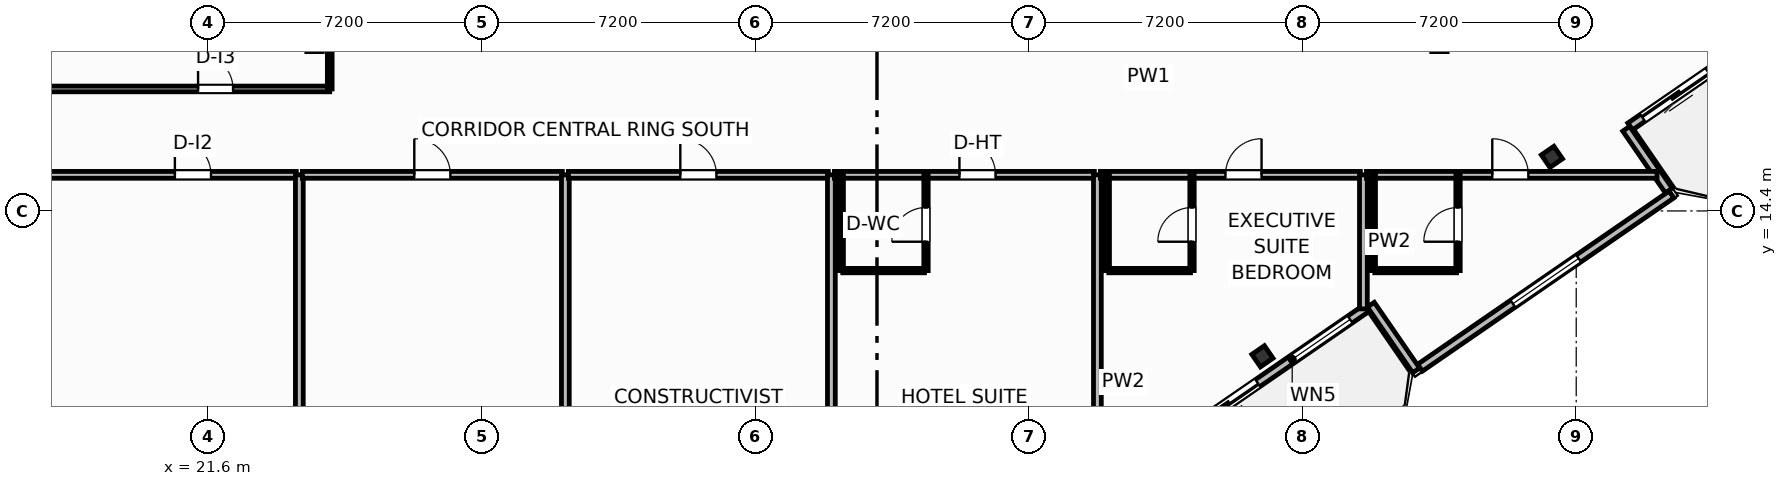
"""IFC4 building model, lengths in metres.
Left out: names, types, materials, properties, quantities, classifications, styles, units other than length and angle.
Written with IfcOpenShell. Run it as: python <this file> out.ifc"""

import sys

from ifc_helpers import new_model, si_unit, direction, frame, frame_2d, origin, origin_2d, place, context, subcontext, project, spatial, rectangle, i_section, extrude, element, fill, save


model = new_model("IFC4")
c1 = context("Model", 3, precision=1e-05, world=origin(), true_north=direction((0.0, 1.0)))
c2 = subcontext(c1, "Body", "Model", "MODEL_VIEW")
j1 = project(units=[si_unit("LENGTHUNIT", "METRE"), si_unit("PLANEANGLEUNIT", "RADIAN")], contexts=[c1])
p1 = place(None, origin())
s1 = spatial("IfcSite", under=j1, at=p1, CompositionType="ELEMENT")
p2 = place(p1, origin())
s2 = spatial("IfcBuilding", under=s1, at=p2, CompositionType="ELEMENT")
p3 = place(p2, frame((0.0, 0.0, 261.9)))
s3 = spatial("IfcBuildingStorey", under=s2, at=p3, CompositionType="ELEMENT", Elevation=261.9)
for number, where, z_axis, x_axis in (
    (1, (49.343, 10.575, 0.0), (0.0, 0.0, 1.0), (0.824, 0.567, 0.0)),
    (2, (56.96, 15.823, 0.0), (0.0, 0.0, 1.0), (0.824, 0.567, 0.0)),
):
    element("IfcColumn", number, at=place(p3, frame(where, z_axis=z_axis, x_axis=x_axis)), inside=s3, PredefinedType="COLUMN", context=c2, shape_type="SweptSolid", body=[
        extrude(i_section(OverallWidth=0.401, OverallDepth=0.399, WebThickness=0.025, FlangeThickness=0.04, FilletRadius=0.022, at=origin_2d()), origin(), (0.0, 0.0, 1.0), 3.7),
    ])
p4 = place(p3, frame((52.103, 11.857, 0.0), z_axis=(0.0, 0.0, 1.0), x_axis=(-0.823534636215, -0.567265989598, 0.0)))
e3 = element("IfcWall", 3, at=p4, inside=s3, PredefinedType="SOLIDWALL", context=c2, shape_type="SweptSolid", body=[
    extrude(rectangle(XDim=6.0, YDim=0.22, at=frame_2d((3.0, 0.0))), origin(), (0.0, 0.0, 1.0), 2.73),
])
p5 = place(p4, frame((3.5, 0.0, 0.0)))
e4 = element("IfcOpeningElement", 4, at=p5, cuts=e3, PredefinedType="OPENING", context=c2, shape_type="SweptSolid", body=[
    extrude(rectangle(XDim=2.1, YDim=2.3, at=frame_2d((1.05, 1.15))), frame((0.0, 0.12, 0.0), z_axis=(0.0, -1.0, 0.0), x_axis=(1.0, 0.0, 0.0)), (0.0, 0.0, 1.0), 0.24),
])
p6 = place(p4, frame((0.55, 0.0, 0.75)))
e5 = element("IfcOpeningElement", 5, at=p6, cuts=e3, PredefinedType="OPENING", context=c2, shape_type="SweptSolid", body=[
    extrude(rectangle(XDim=1.85, YDim=1.75, at=frame_2d((0.925, 0.875))), frame((0.0, 0.12, 0.0), z_axis=(0.0, -1.0, 0.0), x_axis=(1.0, 0.0, 0.0)), (0.0, 0.0, 1.0), 0.24),
])
p7 = place(p3, frame((63.605, 19.78, 0.0), z_axis=(0.0, 0.0, 1.0), x_axis=(-0.823541290762, -0.567256328665, 0.0)))
e6 = element("IfcWall", 6, at=p7, inside=s3, PredefinedType="SOLIDWALL", context=c2, shape_type="SweptSolid", body=[
    extrude(rectangle(XDim=5.567, YDim=0.22, at=frame_2d((2.784, 0.0))), origin(), (0.0, 0.0, 1.0), 2.73),
])
p8 = place(p7, frame((3.067, 0.0, 0.0)))
e7 = element("IfcOpeningElement", 7, at=p8, cuts=e6, PredefinedType="OPENING", context=c2, shape_type="SweptSolid", body=[
    extrude(rectangle(XDim=2.1, YDim=2.3, at=frame_2d((1.05, 1.15))), frame((0.0, 0.12, 0.0), z_axis=(0.0, -1.0, 0.0), x_axis=(1.0, 0.0, 0.0)), (0.0, 0.0, 1.0), 0.24),
])
p9 = place(p3, frame((52.196, 11.933, 0.0), z_axis=(0.0, 0.0, 1.0), x_axis=(0.56729822855, -0.823512428494, 0.0)))
e8 = element("IfcWall", 8, at=p9, inside=s3, PredefinedType="SOLIDWALL", context=c2, shape_type="SweptSolid", body=[
    extrude(rectangle(XDim=2.1, YDim=0.22, at=frame_2d((1.05, 0.0))), origin(), (0.0, 0.0, 1.0), 2.73),
])
p10 = place(p3, frame((53.49, 10.275, 0.0), z_axis=(0.0, 0.0, 1.0), x_axis=(0.823530942962, 0.56727135128, 0.0)))
e9 = element("IfcWall", 9, at=p10, inside=s3, PredefinedType="SOLIDWALL", context=c2, shape_type="SweptSolid", body=[
    extrude(rectangle(XDim=8.035, YDim=0.22, at=frame_2d((4.018, 0.0))), origin(), (0.0, 0.0, 1.0), 2.73),
])
p11 = place(p10, frame((2.968, 0.0, 0.8)))
e10 = element("IfcOpeningElement", 10, at=p11, cuts=e9, PredefinedType="OPENING", context=c2, shape_type="SweptSolid", body=[
    extrude(rectangle(XDim=2.1, YDim=1.75, at=frame_2d((1.05, 0.875))), frame((0.0, 0.12, 0.0), z_axis=(0.0, -1.0, 0.0), x_axis=(1.0, 0.0, 0.0)), (0.0, 0.0, 1.0), 0.24),
])
p12 = place(p3, frame((60.036, 14.936, 0.0), z_axis=(0.0, 0.0, 1.0), x_axis=(-0.567273565974, 0.823529417415, 0.0)))
e11 = element("IfcWall", 11, at=p12, inside=s3, PredefinedType="SOLIDWALL", context=c2, shape_type="SweptSolid", body=[
    extrude(rectangle(XDim=1.975, YDim=0.22, at=frame_2d((0.988, 0.0))), origin(), (0.0, 0.0, 1.0), 2.73),
])
p13 = place(p3, frame((5.0, 17.61, 0.0), z_axis=(0.0, 0.0, 1.0), x_axis=(1.0, 0.0, 0.0)))
e12 = element("IfcWall", 12, at=p13, inside=s3, PredefinedType="PARTITIONING", context=c2, shape_type="SweptSolid", body=[
    extrude(rectangle(XDim=19.8, YDim=0.15, at=frame_2d((9.9, 0.0))), origin(), (0.0, 0.0, 1.0), 2.739),
])
p14 = place(p13, frame((16.335, 0.0, 0.0)))
e13 = element("IfcOpeningElement", 13, at=p14, cuts=e12, PredefinedType="OPENING", context=c2, shape_type="SweptSolid", body=[
    extrude(rectangle(XDim=0.92, YDim=2.05, at=frame_2d((0.46, 1.025))), frame((0.0, 0.085, 0.0), z_axis=(0.0, -1.0, 0.0), x_axis=(1.0, 0.0, 0.0)), (0.0, 0.0, 1.0), 0.17),
])
p15 = place(p3, frame((24.8, 17.61, 0.0), z_axis=(0.0, 0.0, 1.0), x_axis=(0.0, 1.0, 0.0)))
e14 = element("IfcWall", 14, at=p15, inside=s3, PredefinedType="PARTITIONING", context=c2, shape_type="SweptSolid", body=[
    extrude(rectangle(XDim=1.63, YDim=0.125, at=frame_2d((0.815, 0.0))), origin(), (0.0, 0.0, 1.0), 3.45),
])
p16 = place(p3, frame((6.071, 15.35, 0.0), z_axis=(0.0, 0.0, 1.0), x_axis=(1.0, 0.0, 0.0)))
e15 = element("IfcWall", 15, at=p16, inside=s3, PredefinedType="PARTITIONING", context=c2, shape_type="SweptSolid", body=[
    extrude(rectangle(XDim=17.849, YDim=0.18, at=frame_2d((8.924, 0.0))), origin(), (0.0, 0.0, 1.0), 3.45),
])
p17 = place(p16, frame((14.654, 0.0, 0.0)))
e16 = element("IfcOpeningElement", 16, at=p17, cuts=e15, PredefinedType="OPENING", context=c2, shape_type="SweptSolid", body=[
    extrude(rectangle(XDim=0.95, YDim=2.05, at=frame_2d((0.475, 1.025))), frame((0.0, 0.1, 0.0), z_axis=(0.0, -1.0, 0.0), x_axis=(1.0, 0.0, 0.0)), (0.0, 0.0, 1.0), 0.2),
])
p18 = place(p3, frame((24.0, -4.0, 0.0), z_axis=(0.0, 0.0, 1.0), x_axis=(0.0, 1.0, 0.0)))
e17 = element("IfcWall", 17, at=p18, inside=s3, PredefinedType="PARTITIONING", context=c2, shape_type="SweptSolid", body=[
    extrude(rectangle(XDim=19.35, YDim=0.205, at=frame_2d((9.675, 0.0))), origin(), (0.0, 0.0, 1.0), 3.45),
])
p19 = place(p3, frame((24.08, 15.35, 0.0), z_axis=(0.0, 0.0, 1.0), x_axis=(1.0, 0.0, 0.0)))
e18 = element("IfcWall", 18, at=p19, inside=s3, PredefinedType="PARTITIONING", context=c2, shape_type="SweptSolid", body=[
    extrude(rectangle(XDim=6.84, YDim=0.18, at=frame_2d((3.42, 0.0))), origin(), (0.0, 0.0, 1.0), 3.45),
])
p20 = place(p19, frame((2.945, 0.0, 0.0)))
e19 = element("IfcOpeningElement", 19, at=p20, cuts=e18, PredefinedType="OPENING", context=c2, shape_type="SweptSolid", body=[
    extrude(rectangle(XDim=0.95, YDim=2.05, at=frame_2d((0.475, 1.025))), frame((0.0, 0.1, 0.0), z_axis=(0.0, -1.0, 0.0), x_axis=(1.0, 0.0, 0.0)), (0.0, 0.0, 1.0), 0.2),
])
p21 = place(p3, frame((31.0, -5.112, 0.0), z_axis=(0.0, 0.0, 1.0), x_axis=(0.0, 1.0, 0.0)))
e20 = element("IfcWall", 20, at=p21, inside=s3, PredefinedType="PARTITIONING", context=c2, shape_type="SweptSolid", body=[
    extrude(rectangle(XDim=20.462, YDim=0.205, at=frame_2d((10.231, 0.0))), origin(), (0.0, 0.0, 1.0), 3.45),
])
p22 = place(p3, frame((31.08, 15.35, 0.0), z_axis=(0.0, 0.0, 1.0), x_axis=(1.0, 0.0, 0.0)))
e21 = element("IfcWall", 21, at=p22, inside=s3, PredefinedType="PARTITIONING", context=c2, shape_type="SweptSolid", body=[
    extrude(rectangle(XDim=6.84, YDim=0.18, at=frame_2d((3.42, 0.0))), origin(), (0.0, 0.0, 1.0), 3.45),
])
p23 = place(p22, frame((2.945, 0.0, 0.0)))
e22 = element("IfcOpeningElement", 22, at=p23, cuts=e21, PredefinedType="OPENING", context=c2, shape_type="SweptSolid", body=[
    extrude(rectangle(XDim=0.95, YDim=2.05, at=frame_2d((0.475, 1.025))), frame((0.0, 0.1, 0.0), z_axis=(0.0, -1.0, 0.0), x_axis=(1.0, 0.0, 0.0)), (0.0, 0.0, 1.0), 0.2),
])
p24 = place(p3, frame((38.0, 2.179, 0.0), z_axis=(0.0, 0.0, 1.0), x_axis=(0.0, 1.0, 0.0)))
e23 = element("IfcWall", 23, at=p24, inside=s3, PredefinedType="PARTITIONING", context=c2, shape_type="SweptSolid", body=[
    extrude(rectangle(XDim=13.171, YDim=0.205, at=frame_2d((6.585, 0.0))), origin(), (0.0, 0.0, 1.0), 3.45),
])
p25 = place(p3, frame((38.08, 15.35, 0.0), z_axis=(0.0, 0.0, 1.0), x_axis=(1.0, 0.0, 0.0)))
e24 = element("IfcWall", 24, at=p25, inside=s3, PredefinedType="PARTITIONING", context=c2, shape_type="SweptSolid", body=[
    extrude(rectangle(XDim=6.84, YDim=0.18, at=frame_2d((3.42, 0.0))), origin(), (0.0, 0.0, 1.0), 3.45),
])
p26 = place(p25, frame((3.29, 0.0, 0.0)))
e25 = element("IfcOpeningElement", 25, at=p26, cuts=e24, PredefinedType="OPENING", context=c2, shape_type="SweptSolid", body=[
    extrude(rectangle(XDim=0.95, YDim=2.15, at=frame_2d((0.475, 1.075))), frame((0.0, 0.1, 0.0), z_axis=(0.0, -1.0, 0.0), x_axis=(1.0, 0.0, 0.0)), (0.0, 0.0, 1.0), 0.2),
])
p27 = place(p3, frame((38.3, 12.83, 0.0), z_axis=(0.0, 0.0, 1.0), x_axis=(1.0, 0.0, 0.0)))
e26 = element("IfcWall", 26, at=p27, inside=s3, PredefinedType="PARTITIONING", context=c2, shape_type="SweptSolid", body=[
    extrude(rectangle(XDim=2.15, YDim=0.115, at=frame_2d((1.075, 0.0))), origin(), (0.0, 0.0, 1.0), 3.45),
])
p28 = place(p3, frame((40.49, 12.83, 0.0), z_axis=(0.0, 0.0, 1.0), x_axis=(0.0, 1.0, 0.0)))
e27 = element("IfcWall", 27, at=p28, inside=s3, PredefinedType="PARTITIONING", context=c2, shape_type="SweptSolid", body=[
    extrude(rectangle(XDim=2.52, YDim=0.115, at=frame_2d((1.26, 0.0))), origin(), (0.0, 0.0, 1.0), 3.45),
])
p29 = place(p28, frame((0.76, 0.0, 0.0)))
e28 = element("IfcOpeningElement", 28, at=p29, cuts=e27, PredefinedType="OPENING", context=c2, shape_type="SweptSolid", body=[
    extrude(rectangle(XDim=0.9, YDim=2.05, at=frame_2d((0.45, 1.025))), frame((0.0, 0.067, 0.0), z_axis=(0.0, -1.0, 0.0), x_axis=(1.0, 0.0, 0.0)), (0.0, 0.0, 1.0), 0.135),
])
p30 = place(p3, frame((38.26, 12.83, 0.0), z_axis=(0.0, 0.0, 1.0), x_axis=(0.0, 1.0, 0.0)))
e29 = element("IfcWall", 29, at=p30, inside=s3, PredefinedType="PARTITIONING", context=c2, shape_type="SweptSolid", body=[
    extrude(rectangle(XDim=2.52, YDim=0.115, at=frame_2d((1.26, 0.0))), origin(), (0.0, 0.0, 1.0), 3.45),
])
p31 = place(p3, frame((45.0, 4.451, 0.0), z_axis=(0.0, 0.0, 1.0), x_axis=(0.0, 1.0, 0.0)))
e30 = element("IfcWall", 30, at=p31, inside=s3, PredefinedType="PARTITIONING", context=c2, shape_type="SweptSolid", body=[
    extrude(rectangle(XDim=10.899, YDim=0.205, at=frame_2d((5.45, 0.0))), origin(), (0.0, 0.0, 1.0), 3.45),
])
p32 = place(p3, frame((45.08, 15.35, 0.0), z_axis=(0.0, 0.0, 1.0), x_axis=(1.0, 0.0, 0.0)))
e31 = element("IfcWall", 31, at=p32, inside=s3, PredefinedType="PARTITIONING", context=c2, shape_type="SweptSolid", body=[
    extrude(rectangle(XDim=6.84, YDim=0.18, at=frame_2d((3.42, 0.0))), origin(), (0.0, 0.0, 1.0), 3.45),
])
p33 = place(p32, frame((3.29, 0.0, 0.0)))
e32 = element("IfcOpeningElement", 32, at=p33, cuts=e31, PredefinedType="OPENING", context=c2, shape_type="SweptSolid", body=[
    extrude(rectangle(XDim=0.95, YDim=2.15, at=frame_2d((0.475, 1.075))), frame((0.0, 0.1, 0.0), z_axis=(0.0, -1.0, 0.0), x_axis=(1.0, 0.0, 0.0)), (0.0, 0.0, 1.0), 0.2),
])
p34 = place(p3, frame((45.3, 12.83, 0.0), z_axis=(0.0, 0.0, 1.0), x_axis=(1.0, 0.0, 0.0)))
e33 = element("IfcWall", 33, at=p34, inside=s3, PredefinedType="PARTITIONING", context=c2, shape_type="SweptSolid", body=[
    extrude(rectangle(XDim=2.15, YDim=0.115, at=frame_2d((1.075, 0.0))), origin(), (0.0, 0.0, 1.0), 3.018),
])
p35 = place(p3, frame((47.49, 12.83, 0.0), z_axis=(0.0, 0.0, 1.0), x_axis=(0.0, 1.0, 0.0)))
e34 = element("IfcWall", 34, at=p35, inside=s3, PredefinedType="PARTITIONING", context=c2, shape_type="SweptSolid", body=[
    extrude(rectangle(XDim=2.52, YDim=0.115, at=frame_2d((1.26, 0.0))), origin(), (0.0, 0.0, 1.0), 3.45),
])
p36 = place(p35, frame((0.76, 0.0, 0.0)))
e35 = element("IfcOpeningElement", 35, at=p36, cuts=e34, PredefinedType="OPENING", context=c2, shape_type="SweptSolid", body=[
    extrude(rectangle(XDim=0.9, YDim=2.05, at=frame_2d((0.45, 1.025))), frame((0.0, 0.067, 0.0), z_axis=(0.0, -1.0, 0.0), x_axis=(1.0, 0.0, 0.0)), (0.0, 0.0, 1.0), 0.135),
])
p37 = place(p3, frame((45.26, 12.83, 0.0), z_axis=(0.0, 0.0, 1.0), x_axis=(0.0, 1.0, 0.0)))
e36 = element("IfcWall", 36, at=p37, inside=s3, PredefinedType="PARTITIONING", context=c2, shape_type="SweptSolid", body=[
    extrude(rectangle(XDim=2.52, YDim=0.115, at=frame_2d((1.26, 0.0))), origin(), (0.0, 0.0, 1.0), 3.45),
])
p38 = place(p3, frame((52.0, 11.823, 0.0), z_axis=(0.0, 0.0, 1.0), x_axis=(0.0, 1.0, 0.0)))
e37 = element("IfcWall", 37, at=p38, inside=s3, PredefinedType="PARTITIONING", context=c2, shape_type="SweptSolid", body=[
    extrude(rectangle(XDim=3.527, YDim=0.205, at=frame_2d((1.764, 0.0))), origin(), (0.0, 0.0, 1.0), 3.45),
])
p39 = place(p3, frame((52.08, 15.35, 0.0), z_axis=(0.0, 0.0, 1.0), x_axis=(1.0, 0.0, 0.0)))
e38 = element("IfcWall", 38, at=p39, inside=s3, PredefinedType="PARTITIONING", context=c2, shape_type="SweptSolid", body=[
    extrude(rectangle(XDim=7.646, YDim=0.18, at=frame_2d((3.823, 0.0))), origin(), (0.0, 0.0, 1.0), 3.45),
])
p40 = place(p39, frame((3.311, 0.0, 0.0)))
e39 = element("IfcOpeningElement", 39, at=p40, cuts=e38, PredefinedType="OPENING", context=c2, shape_type="SweptSolid", body=[
    extrude(rectangle(XDim=0.95, YDim=2.15, at=frame_2d((0.475, 1.075))), frame((0.0, 0.1, 0.0), z_axis=(0.0, -1.0, 0.0), x_axis=(1.0, 0.0, 0.0)), (0.0, 0.0, 1.0), 0.2),
])
p41 = place(p3, frame((52.3, 12.83, 0.0), z_axis=(0.0, 0.0, 1.0), x_axis=(1.0, 0.0, 0.0)))
e40 = element("IfcWall", 40, at=p41, inside=s3, PredefinedType="PARTITIONING", context=c2, shape_type="SweptSolid", body=[
    extrude(rectangle(XDim=2.15, YDim=0.115, at=frame_2d((1.075, 0.0))), origin(), (0.0, 0.0, 1.0), 3.45),
])
p42 = place(p3, frame((54.49, 12.83, 0.0), z_axis=(0.0, 0.0, 1.0), x_axis=(0.0, 1.0, 0.0)))
e41 = element("IfcWall", 41, at=p42, inside=s3, PredefinedType="PARTITIONING", context=c2, shape_type="SweptSolid", body=[
    extrude(rectangle(XDim=2.52, YDim=0.115, at=frame_2d((1.26, 0.0))), origin(), (0.0, 0.0, 1.0), 3.45),
])
p43 = place(p42, frame((0.76, 0.0, 0.0)))
e42 = element("IfcOpeningElement", 42, at=p43, cuts=e41, PredefinedType="OPENING", context=c2, shape_type="SweptSolid", body=[
    extrude(rectangle(XDim=0.9, YDim=2.05, at=frame_2d((0.45, 1.025))), frame((0.0, 0.067, 0.0), z_axis=(0.0, -1.0, 0.0), x_axis=(1.0, 0.0, 0.0)), (0.0, 0.0, 1.0), 0.135),
])
p44 = place(p3, frame((52.26, 12.83, 0.0), z_axis=(0.0, 0.0, 1.0), x_axis=(0.0, 1.0, 0.0)))
e43 = element("IfcWall", 43, at=p44, inside=s3, PredefinedType="PARTITIONING", context=c2, shape_type="SweptSolid", body=[
    extrude(rectangle(XDim=2.52, YDim=0.115, at=frame_2d((1.26, 0.0))), origin(), (0.0, 0.0, 1.0), 3.45),
])
p45 = place(p5, origin())
e44 = element("IfcDoor", 44, at=p45, inside=s3, OperationType="SLIDING_TO_LEFT", PredefinedType="DOOR", context=c2, shape_type="SweptSolid", body=[
    extrude(rectangle(XDim=2.1, YDim=2.3, at=frame_2d((1.05, 1.15))), frame((0.0, 0.025, 0.0), z_axis=(0.0, -1.0, 0.0), x_axis=(1.0, 0.0, 0.0)), (0.0, 0.0, 1.0), 0.05),
])
fill(e4, e44)
p46 = place(p6, origin())
e45 = element("IfcWindow", 45, at=p46, inside=s3, PartitioningType="SINGLE_PANEL", PredefinedType="WINDOW", context=c2, shape_type="SweptSolid", body=[
    extrude(rectangle(XDim=1.85, YDim=1.75, at=frame_2d((0.925, 0.875))), frame((0.0, 0.03, 0.0), z_axis=(0.0, -1.0, 0.0), x_axis=(1.0, 0.0, 0.0)), (0.0, 0.0, 1.0), 0.06),
])
fill(e5, e45)
p47 = place(p8, origin())
e46 = element("IfcDoor", 46, at=p47, inside=s3, OperationType="SLIDING_TO_LEFT", PredefinedType="DOOR", context=c2, shape_type="SweptSolid", body=[
    extrude(rectangle(XDim=2.1, YDim=2.3, at=frame_2d((1.05, 1.15))), frame((0.0, 0.025, 0.0), z_axis=(0.0, -1.0, 0.0), x_axis=(1.0, 0.0, 0.0)), (0.0, 0.0, 1.0), 0.05),
])
fill(e7, e46)
p48 = place(p11, origin())
e47 = element("IfcWindow", 47, at=p48, inside=s3, PartitioningType="SINGLE_PANEL", PredefinedType="WINDOW", context=c2, shape_type="SweptSolid", body=[
    extrude(rectangle(XDim=2.1, YDim=1.75, at=frame_2d((1.05, 0.875))), frame((0.0, 0.03, 0.0), z_axis=(0.0, -1.0, 0.0), x_axis=(1.0, 0.0, 0.0)), (0.0, 0.0, 1.0), 0.06),
])
fill(e10, e47)
p49 = place(p14, origin())
e48 = element("IfcDoor", 48, at=p49, inside=s3, OperationType="SINGLE_SWING_LEFT", PredefinedType="DOOR", context=c2, shape_type="SweptSolid", body=[
    extrude(rectangle(XDim=0.92, YDim=2.05, at=frame_2d((0.46, 1.025))), frame((0.0, 0.025, 0.0), z_axis=(0.0, -1.0, 0.0), x_axis=(1.0, 0.0, 0.0)), (0.0, 0.0, 1.0), 0.05),
])
fill(e13, e48)
p50 = place(p17, origin())
e49 = element("IfcDoor", 49, at=p50, inside=s3, OperationType="SINGLE_SWING_LEFT", PredefinedType="DOOR", context=c2, shape_type="SweptSolid", body=[
    extrude(rectangle(XDim=0.95, YDim=2.05, at=frame_2d((0.475, 1.025))), frame((0.0, 0.025, 0.0), z_axis=(0.0, -1.0, 0.0), x_axis=(1.0, 0.0, 0.0)), (0.0, 0.0, 1.0), 0.05),
])
fill(e16, e49)
p51 = place(p20, origin())
e50 = element("IfcDoor", 50, at=p51, inside=s3, OperationType="SINGLE_SWING_LEFT", PredefinedType="DOOR", context=c2, shape_type="SweptSolid", body=[
    extrude(rectangle(XDim=0.95, YDim=2.05, at=frame_2d((0.475, 1.025))), frame((0.0, 0.025, 0.0), z_axis=(0.0, -1.0, 0.0), x_axis=(1.0, 0.0, 0.0)), (0.0, 0.0, 1.0), 0.05),
])
fill(e19, e50)
p52 = place(p23, origin())
e51 = element("IfcDoor", 51, at=p52, inside=s3, OperationType="SINGLE_SWING_LEFT", PredefinedType="DOOR", context=c2, shape_type="SweptSolid", body=[
    extrude(rectangle(XDim=0.95, YDim=2.05, at=frame_2d((0.475, 1.025))), frame((0.0, 0.025, 0.0), z_axis=(0.0, -1.0, 0.0), x_axis=(1.0, 0.0, 0.0)), (0.0, 0.0, 1.0), 0.05),
])
fill(e22, e51)
p53 = place(p26, origin())
e52 = element("IfcDoor", 52, at=p53, inside=s3, OperationType="SINGLE_SWING_LEFT", PredefinedType="DOOR", context=c2, shape_type="SweptSolid", body=[
    extrude(rectangle(XDim=0.95, YDim=2.15, at=frame_2d((0.475, 1.075))), frame((0.0, 0.025, 0.0), z_axis=(0.0, -1.0, 0.0), x_axis=(1.0, 0.0, 0.0)), (0.0, 0.0, 1.0), 0.05),
])
fill(e25, e52)
p54 = place(p29, origin())
e53 = element("IfcDoor", 53, at=p54, inside=s3, OperationType="SINGLE_SWING_LEFT", PredefinedType="DOOR", context=c2, shape_type="SweptSolid", body=[
    extrude(rectangle(XDim=0.9, YDim=2.05, at=frame_2d((0.45, 1.025))), frame((0.0, 0.025, 0.0), z_axis=(0.0, -1.0, 0.0), x_axis=(1.0, 0.0, 0.0)), (0.0, 0.0, 1.0), 0.05),
])
fill(e28, e53)
p55 = place(p33, origin())
e54 = element("IfcDoor", 54, at=p55, inside=s3, OperationType="SINGLE_SWING_RIGHT", PredefinedType="DOOR", context=c2, shape_type="SweptSolid", body=[
    extrude(rectangle(XDim=0.95, YDim=2.15, at=frame_2d((0.475, 1.075))), frame((0.0, 0.025, 0.0), z_axis=(0.0, -1.0, 0.0), x_axis=(1.0, 0.0, 0.0)), (0.0, 0.0, 1.0), 0.05),
])
fill(e32, e54)
p56 = place(p36, origin())
e55 = element("IfcDoor", 55, at=p56, inside=s3, OperationType="SINGLE_SWING_LEFT", PredefinedType="DOOR", context=c2, shape_type="SweptSolid", body=[
    extrude(rectangle(XDim=0.9, YDim=2.05, at=frame_2d((0.45, 1.025))), frame((0.0, 0.025, 0.0), z_axis=(0.0, -1.0, 0.0), x_axis=(1.0, 0.0, 0.0)), (0.0, 0.0, 1.0), 0.05),
])
fill(e35, e55)
p57 = place(p40, origin())
e56 = element("IfcDoor", 56, at=p57, inside=s3, OperationType="SINGLE_SWING_LEFT", PredefinedType="DOOR", context=c2, shape_type="SweptSolid", body=[
    extrude(rectangle(XDim=0.95, YDim=2.15, at=frame_2d((0.475, 1.075))), frame((0.0, 0.025, 0.0), z_axis=(0.0, -1.0, 0.0), x_axis=(1.0, 0.0, 0.0)), (0.0, 0.0, 1.0), 0.05),
])
fill(e39, e56)
p58 = place(p43, origin())
e57 = element("IfcDoor", 57, at=p58, inside=s3, OperationType="SINGLE_SWING_LEFT", PredefinedType="DOOR", context=c2, shape_type="SweptSolid", body=[
    extrude(rectangle(XDim=0.9, YDim=2.05, at=frame_2d((0.45, 1.025))), frame((0.0, 0.025, 0.0), z_axis=(0.0, -1.0, 0.0), x_axis=(1.0, 0.0, 0.0)), (0.0, 0.0, 1.0), 0.05),
])
fill(e42, e57)
save(model, sys.argv[1])
